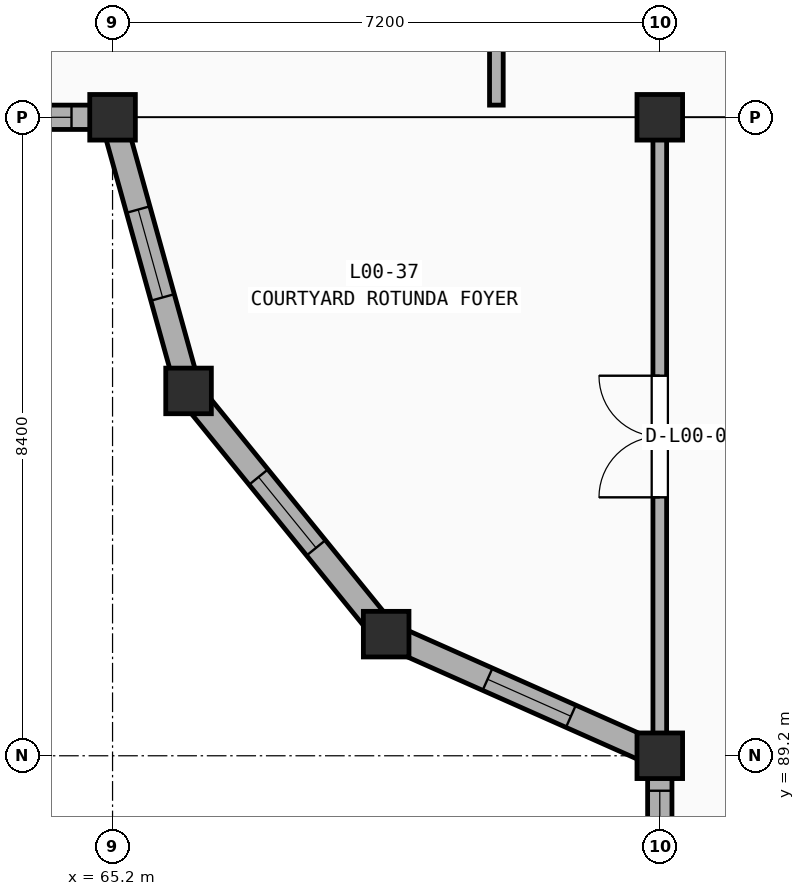
"""IFC4 building model, lengths in metres.
Left out: names, types, materials, properties, quantities, classifications, styles, units other than length and angle.
Written with IfcOpenShell. Run it as: python <this file> out.ifc"""

import sys

from ifc_helpers import new_model, si_unit, direction, frame, frame_2d, origin, origin_2d, place, context, subcontext, project, spatial, rectangle, extrude, element, fill, save


model = new_model("IFC4")
c1 = context("Model", 3, precision=1e-05, world=origin(), true_north=direction((0.0, 1.0)))
c2 = subcontext(c1, "Body", "Model", "MODEL_VIEW")
j1 = project(units=[si_unit("LENGTHUNIT", "METRE"), si_unit("PLANEANGLEUNIT", "RADIAN")], contexts=[c1])
p1 = place(None, origin())
s1 = spatial("IfcSite", under=j1, at=p1, CompositionType="ELEMENT")
p2 = place(p1, origin())
s2 = spatial("IfcBuilding", under=s1, at=p2, CompositionType="ELEMENT")
p3 = place(p2, origin())
s3 = spatial("IfcBuildingStorey", under=s2, at=p3, CompositionType="ELEMENT", Elevation=0.0)
for number, where, z_axis, x_axis in (
    (1, (65.2, 97.6, 0.0), (0.0, 0.0, 1.0), (1.0, 0.0, 0.0)),
    (2, (66.2, 94.0, 0.0), (0.0, 0.0, 1.0), (1.0, 0.0, 0.0)),
    (3, (68.8, 90.8, 0.0), (0.0, 0.0, 1.0), (1.0, 0.0, 0.0)),
    (4, (72.4, 89.2, 0.0), (0.0, 0.0, 1.0), (1.0, 0.0, 0.0)),
    (5, (72.4, 97.6, 0.0), (0.0, 0.0, 1.0), (1.0, 0.0, 0.0)),
):
    element("IfcColumn", number, at=place(p3, frame(where, z_axis=z_axis, x_axis=x_axis)), inside=s3, PredefinedType="COLUMN", context=c2, shape_type="SweptSolid", body=[
        extrude(rectangle(XDim=0.6, YDim=0.6, at=origin_2d()), origin(), (0.0, 0.0, 1.0), 5.4),
    ])
p4 = place(p3, frame((70.25, 97.76, 0.0), z_axis=(0.0, 0.0, 1.0), x_axis=(0.0, 1.0, 0.0)))
e6 = element("IfcWall", 6, at=p4, inside=s3, PredefinedType="PARTITIONING", context=c2, shape_type="SweptSolid", body=[
    extrude(rectangle(XDim=4.19, YDim=0.18, at=frame_2d((2.095, 0.0))), origin(), (0.0, 0.0, 1.0), 4.64),
])
p5 = place(p3, frame((72.4, 89.2, 0.0), z_axis=(0.0, 0.0, 1.0), x_axis=(0.0, 1.0, 0.0)))
e7 = element("IfcWall", 7, at=p5, inside=s3, PredefinedType="PARTITIONING", context=c2, shape_type="SweptSolid", body=[
    extrude(rectangle(XDim=8.4, YDim=0.18, at=frame_2d((4.2, 0.0))), origin(), (0.0, 0.0, 1.0), 4.54),
])
p6 = place(p5, frame((3.4, 0.0, -0.01)))
e8 = element("IfcOpeningElement", 8, at=p6, cuts=e7, PredefinedType="OPENING", context=c2, shape_type="SweptSolid", body=[
    extrude(rectangle(XDim=1.6, YDim=2.21, at=frame_2d((0.8, 1.105))), frame((0.0, 0.1, 0.0), z_axis=(0.0, -1.0, 0.0), x_axis=(1.0, 0.0, 0.0)), (0.0, 0.0, 1.0), 0.2),
])
p7 = place(p3, frame((58.0, 97.6, 0.0), z_axis=(0.0, 0.0, 1.0), x_axis=(1.0, 0.0, 0.0)))
e9 = element("IfcWall", 9, at=p7, inside=s3, PredefinedType="SOLIDWALL", context=c2, shape_type="SweptSolid", body=[
    extrude(rectangle(XDim=7.2, YDim=0.32, at=frame_2d((3.6, 0.0))), origin(), (0.0, 0.0, 1.0), 4.64),
])
p8 = place(p7, frame((0.46, 0.0, 0.9)))
e10 = element("IfcOpeningElement", 10, at=p8, cuts=e9, PredefinedType="OPENING", context=c2, shape_type="SweptSolid", body=[
    extrude(rectangle(XDim=1.8, YDim=2.2, at=frame_2d((0.9, 1.1))), frame((0.0, 0.17, 0.0), z_axis=(0.0, -1.0, 0.0), x_axis=(1.0, 0.0, 0.0)), (0.0, 0.0, 1.0), 0.34),
])
p9 = place(p7, frame((4.86, 0.0, 0.9)))
e11 = element("IfcOpeningElement", 11, at=p9, cuts=e9, PredefinedType="OPENING", context=c2, shape_type="SweptSolid", body=[
    extrude(rectangle(XDim=1.8, YDim=2.2, at=frame_2d((0.9, 1.1))), frame((0.0, 0.17, 0.0), z_axis=(0.0, -1.0, 0.0), x_axis=(1.0, 0.0, 0.0)), (0.0, 0.0, 1.0), 0.34),
])
p10 = place(p3, frame((72.4, 89.2, 0.0), z_axis=(0.0, 0.0, 1.0), x_axis=(0.0, -1.0, 0.0)))
e12 = element("IfcWall", 12, at=p10, inside=s3, PredefinedType="SOLIDWALL", context=c2, shape_type="SweptSolid", body=[
    extrude(rectangle(XDim=8.4, YDim=0.32, at=frame_2d((4.2, 0.0))), origin(), (0.0, 0.0, 1.0), 4.54),
])
p11 = place(p10, frame((0.46, 0.0, 0.9)))
e13 = element("IfcOpeningElement", 13, at=p11, cuts=e12, PredefinedType="OPENING", context=c2, shape_type="SweptSolid", body=[
    extrude(rectangle(XDim=2.4, YDim=2.35, at=frame_2d((1.2, 1.175))), frame((0.0, 0.17, 0.0), z_axis=(0.0, -1.0, 0.0), x_axis=(1.0, 0.0, 0.0)), (0.0, 0.0, 1.0), 0.34),
])
p12 = place(p10, frame((5.46, 0.0, 0.9)))
e14 = element("IfcOpeningElement", 14, at=p12, cuts=e12, PredefinedType="OPENING", context=c2, shape_type="SweptSolid", body=[
    extrude(rectangle(XDim=2.4, YDim=2.35, at=frame_2d((1.2, 1.175))), frame((0.0, 0.17, 0.0), z_axis=(0.0, -1.0, 0.0), x_axis=(1.0, 0.0, 0.0)), (0.0, 0.0, 1.0), 0.34),
])
p13 = place(p3, frame((65.2, 97.6, 0.0), z_axis=(0.0, 0.0, 1.0), x_axis=(0.267637123724, -0.963519781844, 0.0)))
e15 = element("IfcWall", 15, at=p13, inside=s3, PredefinedType="SOLIDWALL", context=c2, shape_type="SweptSolid", body=[
    extrude(rectangle(XDim=3.736, YDim=0.32, at=frame_2d((1.868, 0.0))), origin(), (0.0, 0.0, 1.0), 4.64),
])
p14 = place(p13, frame((1.26, 0.0, 0.9)))
e16 = element("IfcOpeningElement", 16, at=p14, cuts=e15, PredefinedType="OPENING", context=c2, shape_type="SweptSolid", body=[
    extrude(rectangle(XDim=1.2, YDim=2.35, at=frame_2d((0.6, 1.175))), frame((0.0, 0.17, 0.0), z_axis=(0.0, -1.0, 0.0), x_axis=(1.0, 0.0, 0.0)), (0.0, 0.0, 1.0), 0.34),
])
p15 = place(p3, frame((66.2, 94.0, 0.0), z_axis=(0.0, 0.0, 1.0), x_axis=(0.630612687458, -0.776097699015, 0.0)))
e17 = element("IfcWall", 17, at=p15, inside=s3, PredefinedType="SOLIDWALL", context=c2, shape_type="SweptSolid", body=[
    extrude(rectangle(XDim=4.123, YDim=0.32, at=frame_2d((2.062, 0.0))), origin(), (0.0, 0.0, 1.0), 4.64),
])
p16 = place(p15, frame((1.46, 0.0, 0.9)))
e18 = element("IfcOpeningElement", 18, at=p16, cuts=e17, PredefinedType="OPENING", context=c2, shape_type="SweptSolid", body=[
    extrude(rectangle(XDim=1.2, YDim=2.35, at=frame_2d((0.6, 1.175))), frame((0.0, 0.17, 0.0), z_axis=(0.0, -1.0, 0.0), x_axis=(1.0, 0.0, 0.0)), (0.0, 0.0, 1.0), 0.34),
])
p17 = place(p3, frame((68.8, 90.8, 0.0), z_axis=(0.0, 0.0, 1.0), x_axis=(0.913796214371, -0.40617296636, 0.0)))
e19 = element("IfcWall", 19, at=p17, inside=s3, PredefinedType="SOLIDWALL", context=c2, shape_type="SweptSolid", body=[
    extrude(rectangle(XDim=3.939, YDim=0.32, at=frame_2d((1.97, 0.0))), origin(), (0.0, 0.0, 1.0), 4.64),
])
p18 = place(p17, frame((1.46, 0.0, 0.9)))
e20 = element("IfcOpeningElement", 20, at=p18, cuts=e19, PredefinedType="OPENING", context=c2, shape_type="SweptSolid", body=[
    extrude(rectangle(XDim=1.2, YDim=2.35, at=frame_2d((0.6, 1.175))), frame((0.0, 0.17, 0.0), z_axis=(0.0, -1.0, 0.0), x_axis=(1.0, 0.0, 0.0)), (0.0, 0.0, 1.0), 0.34),
])
p19 = place(p6, frame((0.0, 0.0, 0.01)))
e21 = element("IfcDoor", 21, at=p19, inside=s3, OperationType="DOUBLE_SWING_LEFT", PredefinedType="DOOR", context=c2, shape_type="SweptSolid", body=[
    extrude(rectangle(XDim=1.6, YDim=2.2, at=frame_2d((0.8, 1.1))), frame((0.0, 0.025, 0.0), z_axis=(0.0, -1.0, 0.0), x_axis=(1.0, 0.0, 0.0)), (0.0, 0.0, 1.0), 0.05),
])
fill(e8, e21)
p20 = place(p9, origin())
e22 = element("IfcWindow", 22, at=p20, inside=s3, PartitioningType="DOUBLE_PANEL_VERTICAL", PredefinedType="WINDOW", context=c2, shape_type="SweptSolid", body=[
    extrude(rectangle(XDim=1.8, YDim=2.2, at=frame_2d((0.9, 1.1))), frame((0.0, 0.03, 0.0), z_axis=(0.0, -1.0, 0.0), x_axis=(1.0, 0.0, 0.0)), (0.0, 0.0, 1.0), 0.06),
])
fill(e11, e22)
p21 = place(p11, origin())
e23 = element("IfcWindow", 23, at=p21, inside=s3, PartitioningType="TRIPLE_PANEL_VERTICAL", PredefinedType="WINDOW", context=c2, shape_type="SweptSolid", body=[
    extrude(rectangle(XDim=2.4, YDim=2.35, at=frame_2d((1.2, 1.175))), frame((0.0, 0.03, 0.0), z_axis=(0.0, -1.0, 0.0), x_axis=(1.0, 0.0, 0.0)), (0.0, 0.0, 1.0), 0.06),
])
fill(e13, e23)
p22 = place(p14, origin())
e24 = element("IfcWindow", 24, at=p22, inside=s3, PartitioningType="SINGLE_PANEL", PredefinedType="WINDOW", context=c2, shape_type="SweptSolid", body=[
    extrude(rectangle(XDim=1.2, YDim=2.35, at=frame_2d((0.6, 1.175))), frame((0.0, 0.03, 0.0), z_axis=(0.0, -1.0, 0.0), x_axis=(1.0, 0.0, 0.0)), (0.0, 0.0, 1.0), 0.06),
])
fill(e16, e24)
p23 = place(p16, origin())
e25 = element("IfcWindow", 25, at=p23, inside=s3, PartitioningType="SINGLE_PANEL", PredefinedType="WINDOW", context=c2, shape_type="SweptSolid", body=[
    extrude(rectangle(XDim=1.2, YDim=2.35, at=frame_2d((0.6, 1.175))), frame((0.0, 0.03, 0.0), z_axis=(0.0, -1.0, 0.0), x_axis=(1.0, 0.0, 0.0)), (0.0, 0.0, 1.0), 0.06),
])
fill(e18, e25)
p24 = place(p18, origin())
e26 = element("IfcWindow", 26, at=p24, inside=s3, PartitioningType="SINGLE_PANEL", PredefinedType="WINDOW", context=c2, shape_type="SweptSolid", body=[
    extrude(rectangle(XDim=1.2, YDim=2.35, at=frame_2d((0.6, 1.175))), frame((0.0, 0.03, 0.0), z_axis=(0.0, -1.0, 0.0), x_axis=(1.0, 0.0, 0.0)), (0.0, 0.0, 1.0), 0.06),
])
fill(e20, e26)
save(model, sys.argv[1])
